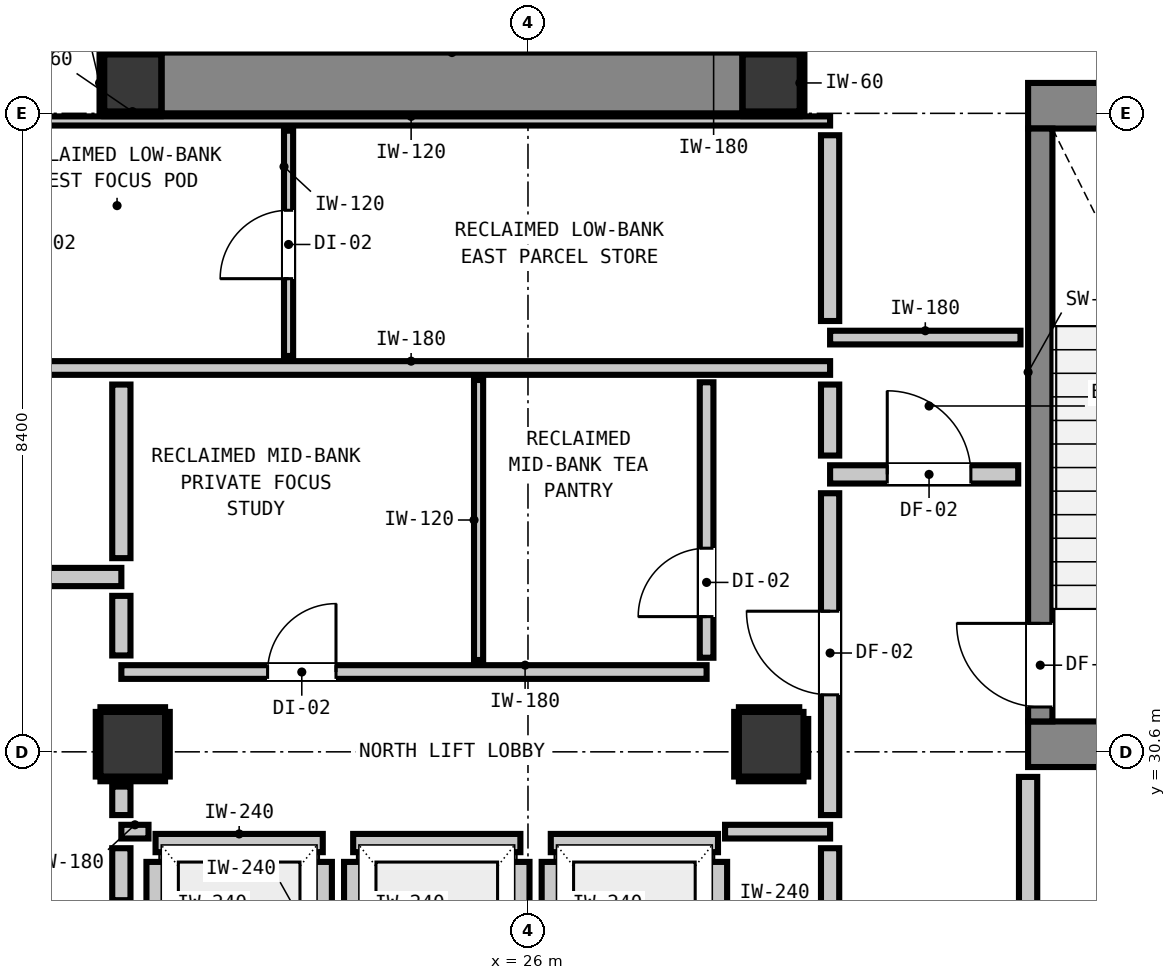
"""IFC4 building model, lengths in metres.
Left out: names, types, materials, properties, quantities, classifications, styles, units other than length and angle.
Written with IfcOpenShell. Run it as: python <this file> out.ifc"""

import sys

from ifc_helpers import new_model, si_unit, direction, frame, frame_2d, origin, origin_2d, place, context, subcontext, project, spatial, rectangle, extrude, element, fill, save


model = new_model("IFC4")
c1 = context("Model", 3, precision=1e-05, world=origin(), true_north=direction((0.0, 1.0)))
c2 = subcontext(c1, "Body", "Model", "MODEL_VIEW")
j1 = project(units=[si_unit("LENGTHUNIT", "METRE"), si_unit("PLANEANGLEUNIT", "RADIAN")], contexts=[c1])
p1 = place(None, origin())
s1 = spatial("IfcSite", under=j1, at=p1, CompositionType="ELEMENT")
p2 = place(p1, origin())
s2 = spatial("IfcBuilding", under=s1, at=p2, CompositionType="ELEMENT")
p3 = place(p2, frame((0.0, 0.0, 226.68)))
s3 = spatial("IfcBuildingStorey", under=s2, at=p3, CompositionType="ELEMENT", Elevation=226.68)
for number, where, z_axis, x_axis in (
    (1, (20.8, 39.4, 0.0), (0.0, 0.0, 1.0), (1.0, 0.0, 0.0)),
    (2, (29.2, 39.4, 0.0), (0.0, 0.0, 1.0), (1.0, 0.0, 0.0)),
):
    element("IfcColumn", number, at=place(p3, frame(where, z_axis=z_axis, x_axis=x_axis)), inside=s3, PredefinedType="COLUMN", context=c2, shape_type="SweptSolid", body=[
        extrude(rectangle(XDim=0.75, YDim=0.75, at=origin_2d()), origin(), (0.0, 0.0, 1.0), 4.6),
    ])
p4 = place(p3, frame((32.58, 39.1, 0.0), z_axis=(0.0, 0.0, 1.0), x_axis=(1.0, 0.0, 0.0)))
e3 = element("IfcWall", 3, at=p4, inside=s3, PredefinedType="SHEAR", context=c2, shape_type="SweptSolid", body=[
    extrude(rectangle(XDim=4.08, YDim=0.6, at=frame_2d((2.04, 0.0))), origin(), (0.0, 0.0, 1.0), 4.6),
])
p5 = place(p3, frame((32.58, 30.7, 0.0), z_axis=(0.0, 0.0, 1.0), x_axis=(1.0, 0.0, 0.0)))
e4 = element("IfcWall", 4, at=p5, inside=s3, PredefinedType="SHEAR", context=c2, shape_type="SweptSolid", body=[
    extrude(rectangle(XDim=3.54, YDim=0.6, at=frame_2d((1.77, 0.0))), origin(), (0.0, 0.0, 1.0), 4.6),
])
p6 = place(p3, frame((21.18, 39.4, 0.0), z_axis=(0.0, 0.0, 1.0), x_axis=(1.0, 0.0, 0.0)))
e5 = element("IfcWall", 5, at=p6, inside=s3, PredefinedType="SHEAR", context=c2, shape_type="SweptSolid", body=[
    extrude(rectangle(XDim=7.64, YDim=0.8, at=frame_2d((3.82, 0.0))), origin(), (0.0, 0.0, 1.0), 4.6),
])
p7 = place(p3, frame((32.74, 31.0, 0.0), z_axis=(0.0, 0.0, 1.0), x_axis=(0.0, 1.0, 0.0)))
e6 = element("IfcWall", 6, at=p7, inside=s3, PredefinedType="SHEAR", context=c2, shape_type="SweptSolid", body=[
    extrude(rectangle(XDim=7.8, YDim=0.32, at=frame_2d((3.9, 0.0))), origin(), (0.0, 0.0, 1.0), 4.6),
])
p8 = place(p7, frame((0.19, 0.0, 0.0)))
e7 = element("IfcOpeningElement", 7, at=p8, cuts=e6, PredefinedType="OPENING", context=c2, shape_type="SweptSolid", body=[
    extrude(rectangle(XDim=1.1, YDim=2.15, at=frame_2d((0.55, 1.075))), frame((0.0, 0.17, 0.0), z_axis=(0.0, -1.0, 0.0), x_axis=(1.0, 0.0, 0.0)), (0.0, 0.0, 1.0), 0.34),
])
for number, where, z_axis, x_axis in (
    (8, (20.8, 30.7, 0.0), (0.0, 0.0, 1.0), (1.0, 0.0, 0.0)),
    (9, (29.2, 30.7, 0.0), (0.0, 0.0, 1.0), (1.0, 0.0, 0.0)),
):
    element("IfcColumn", number, at=place(p3, frame(where, z_axis=z_axis, x_axis=x_axis)), inside=s3, PredefinedType="COLUMN", context=c2, shape_type="SweptSolid", body=[
        extrude(rectangle(XDim=0.85, YDim=0.85, at=origin_2d()), origin(), (0.0, 0.0, 1.0), 4.6),
    ])
p9 = place(p3, frame((21.1, 29.4, 0.0), z_axis=(0.0, 0.0, 1.0), x_axis=(1.0, 0.0, 0.0)))
e10 = element("IfcWall", 10, at=p9, inside=s3, PredefinedType="PARTITIONING", context=c2, shape_type="SweptSolid", body=[
    extrude(rectangle(XDim=2.2, YDim=0.24, at=frame_2d((1.1, 0.0))), origin(), (0.0, 0.0, 1.0), 4.18),
])
p10 = place(p3, frame((21.1, 27.048, 0.0), z_axis=(0.0, 0.0, 1.0), x_axis=(0.0, 1.0, 0.0)))
e11 = element("IfcWall", 11, at=p10, inside=s3, PredefinedType="PARTITIONING", context=c2, shape_type="SweptSolid", body=[
    extrude(rectangle(XDim=2.104, YDim=0.24, at=frame_2d((1.052, 0.0))), origin(), (0.0, 0.0, 1.0), 2.185),
])
p11 = place(p3, frame((23.3, 27.048, 0.0), z_axis=(0.0, 0.0, 1.0), x_axis=(0.0, 1.0, 0.0)))
e12 = element("IfcWall", 12, at=p11, inside=s3, PredefinedType="PARTITIONING", context=c2, shape_type="SweptSolid", body=[
    extrude(rectangle(XDim=2.104, YDim=0.24, at=frame_2d((1.052, 0.0))), origin(), (0.0, 0.0, 1.0), 4.18),
])
p12 = place(p3, frame((23.7, 29.4, 0.0), z_axis=(0.0, 0.0, 1.0), x_axis=(1.0, 0.0, 0.0)))
e13 = element("IfcWall", 13, at=p12, inside=s3, PredefinedType="PARTITIONING", context=c2, shape_type="SweptSolid", body=[
    extrude(rectangle(XDim=2.2, YDim=0.24, at=frame_2d((1.1, 0.0))), origin(), (0.0, 0.0, 1.0), 4.18),
])
for number, where, z_axis, x_axis in (
    (14, (23.7, 27.048, 0.0), (0.0, 0.0, 1.0), (0.0, 1.0, 0.0)),
    (15, (25.9, 27.048, 0.0), (0.0, 0.0, 1.0), (0.0, 1.0, 0.0)),
):
    element("IfcWall", number, at=place(p3, frame(where, z_axis=z_axis, x_axis=x_axis)), inside=s3, PredefinedType="PARTITIONING", context=c2, shape_type="SweptSolid", body=[
        extrude(rectangle(XDim=2.104, YDim=0.24, at=frame_2d((1.052, 0.0))), origin(), (0.0, 0.0, 1.0), 4.18),
    ])
p13 = place(p3, frame((26.3, 29.4, 0.0), z_axis=(0.0, 0.0, 1.0), x_axis=(1.0, 0.0, 0.0)))
e16 = element("IfcWall", 16, at=p13, inside=s3, PredefinedType="PARTITIONING", context=c2, shape_type="SweptSolid", body=[
    extrude(rectangle(XDim=2.2, YDim=0.24, at=frame_2d((1.1, 0.0))), origin(), (0.0, 0.0, 1.0), 4.18),
])
p14 = place(p3, frame((26.3, 27.048, 0.0), z_axis=(0.0, 0.0, 1.0), x_axis=(0.0, 1.0, 0.0)))
e17 = element("IfcWall", 17, at=p14, inside=s3, PredefinedType="PARTITIONING", context=c2, shape_type="SweptSolid", body=[
    extrude(rectangle(XDim=2.104, YDim=0.24, at=frame_2d((1.052, 0.0))), origin(), (0.0, 0.0, 1.0), 4.18),
])
p15 = place(p3, frame((28.5, 27.33, 0.0), z_axis=(0.0, 0.0, 1.0), x_axis=(0.0, 1.0, 0.0)))
e18 = element("IfcWall", 18, at=p15, inside=s3, PredefinedType="PARTITIONING", context=c2, shape_type="SweptSolid", body=[
    extrude(rectangle(XDim=1.822, YDim=0.24, at=frame_2d((0.911, 0.0))), origin(), (0.0, 0.0, 1.0), 2.185),
])
p16 = place(p3, frame((17.45, 32.9, 0.0), z_axis=(0.0, 0.0, 1.0), x_axis=(1.0, 0.0, 0.0)))
e19 = element("IfcWall", 19, at=p16, inside=s3, PredefinedType="PARTITIONING", context=c2, shape_type="SweptSolid", body=[
    extrude(rectangle(XDim=3.2, YDim=0.24, at=frame_2d((1.6, 0.0))), origin(), (0.0, 0.0, 1.0), 4.18),
])
p17 = place(p16, frame((0.159, 0.0, 0.0)))
e20 = element("IfcOpeningElement", 20, at=p17, cuts=e19, PredefinedType="OPENING", context=c2, shape_type="SweptSolid", body=[
    extrude(rectangle(XDim=1.1, YDim=2.15, at=frame_2d((0.55, 1.075))), frame((0.0, 0.13, 0.0), z_axis=(0.0, -1.0, 0.0), x_axis=(1.0, 0.0, 0.0)), (0.0, 0.0, 1.0), 0.26),
])
p18 = place(p3, frame((29.975, 34.25, 0.0), z_axis=(0.0, 0.0, 1.0), x_axis=(1.0, 0.0, 0.0)))
e21 = element("IfcWall", 21, at=p18, inside=s3, PredefinedType="PARTITIONING", context=c2, shape_type="SweptSolid", body=[
    extrude(rectangle(XDim=2.475, YDim=0.24, at=frame_2d((1.237, 0.0))), origin(), (0.0, 0.0, 1.0), 4.18),
])
p19 = place(p18, frame((0.752, 0.0, 0.0)))
e22 = element("IfcOpeningElement", 22, at=p19, cuts=e21, PredefinedType="OPENING", context=c2, shape_type="SweptSolid", body=[
    extrude(rectangle(XDim=1.1, YDim=2.15, at=frame_2d((0.55, 1.075))), frame((0.0, 0.13, 0.0), z_axis=(0.0, -1.0, 0.0), x_axis=(1.0, 0.0, 0.0)), (0.0, 0.0, 1.0), 0.26),
])
p20 = place(p3, frame((20.65, 29.55, 0.0), z_axis=(0.0, 0.0, 1.0), x_axis=(1.0, 0.0, 0.0)))
e23 = element("IfcWall", 23, at=p20, inside=s3, PredefinedType="PARTITIONING", context=c2, shape_type="SweptSolid", body=[
    extrude(rectangle(XDim=0.357, YDim=0.18, at=frame_2d((0.179, 0.0))), origin(), (0.0, 0.0, 1.0), 4.18),
])
p21 = place(p3, frame((28.593, 29.55, 0.0), z_axis=(0.0, 0.0, 1.0), x_axis=(1.0, 0.0, 0.0)))
e24 = element("IfcWall", 24, at=p21, inside=s3, PredefinedType="PARTITIONING", context=c2, shape_type="SweptSolid", body=[
    extrude(rectangle(XDim=1.382, YDim=0.18, at=frame_2d((0.691, 0.0))), origin(), (0.0, 0.0, 1.0), 4.18),
])
p22 = place(p3, frame((20.65, 31.65, 0.0), z_axis=(0.0, 0.0, 1.0), x_axis=(1.0, 0.0, 0.0)))
e25 = element("IfcWall", 25, at=p22, inside=s3, PredefinedType="PARTITIONING", context=c2, shape_type="SweptSolid", body=[
    extrude(rectangle(XDim=7.7, YDim=0.18, at=frame_2d((3.85, 0.0))), origin(), (0.0, 0.0, 1.0), 4.18),
])
p23 = place(p22, frame((1.924, 0.0, 0.0)))
e26 = element("IfcOpeningElement", 26, at=p23, cuts=e25, PredefinedType="OPENING", context=c2, shape_type="SweptSolid", body=[
    extrude(rectangle(XDim=0.9, YDim=2.1, at=frame_2d((0.45, 1.05))), frame((0.0, 0.1, 0.0), z_axis=(0.0, -1.0, 0.0), x_axis=(1.0, 0.0, 0.0)), (0.0, 0.0, 1.0), 0.2),
])
p24 = place(p3, frame((18.95, 35.65, 0.0), z_axis=(0.0, 0.0, 1.0), x_axis=(1.0, 0.0, 0.0)))
e27 = element("IfcWall", 27, at=p24, inside=s3, PredefinedType="PARTITIONING", context=c2, shape_type="SweptSolid", body=[
    extrude(rectangle(XDim=11.025, YDim=0.18, at=frame_2d((5.513, 0.0))), origin(), (0.0, 0.0, 1.0), 4.18),
])
p25 = place(p3, frame((29.975, 36.05, 0.0), z_axis=(0.0, 0.0, 1.0), x_axis=(1.0, 0.0, 0.0)))
e28 = element("IfcWall", 28, at=p25, inside=s3, PredefinedType="PARTITIONING", context=c2, shape_type="SweptSolid", body=[
    extrude(rectangle(XDim=2.505, YDim=0.18, at=frame_2d((1.252, 0.0))), origin(), (0.0, 0.0, 1.0), 4.18),
])
p26 = place(p3, frame((18.95, 38.9, 0.0), z_axis=(0.0, 0.0, 1.0), x_axis=(1.0, 0.0, 0.0)))
e29 = element("IfcWall", 29, at=p26, inside=s3, PredefinedType="PARTITIONING", context=c2, shape_type="SweptSolid", body=[
    extrude(rectangle(XDim=11.025, YDim=0.12, at=frame_2d((5.513, 0.0))), origin(), (0.0, 0.0, 1.0), 2.185),
])
p27 = place(p3, frame((20.65, 28.648, 0.0), z_axis=(0.0, 0.0, 1.0), x_axis=(0.0, 1.0, 0.0)))
e30 = element("IfcWall", 30, at=p27, inside=s3, PredefinedType="PARTITIONING", context=c2, shape_type="SweptSolid", body=[
    extrude(rectangle(XDim=0.684, YDim=0.24, at=frame_2d((0.342, 0.0))), origin(), (0.0, 0.0, 1.0), 2.185),
])
p28 = place(p3, frame((20.65, 29.768, 0.0), z_axis=(0.0, 0.0, 1.0), x_axis=(0.0, 1.0, 0.0)))
e31 = element("IfcWall", 31, at=p28, inside=s3, PredefinedType="PARTITIONING", context=c2, shape_type="SweptSolid", body=[
    extrude(rectangle(XDim=0.375, YDim=0.24, at=frame_2d((0.188, 0.0))), origin(), (0.0, 0.0, 1.0), 2.185),
])
p29 = place(p3, frame((20.65, 31.868, 0.0), z_axis=(0.0, 0.0, 1.0), x_axis=(0.0, 1.0, 0.0)))
e32 = element("IfcWall", 32, at=p29, inside=s3, PredefinedType="PARTITIONING", context=c2, shape_type="SweptSolid", body=[
    extrude(rectangle(XDim=0.784, YDim=0.24, at=frame_2d((0.392, 0.0))), origin(), (0.0, 0.0, 1.0), 2.185),
])
p30 = place(p3, frame((20.65, 33.148, 0.0), z_axis=(0.0, 0.0, 1.0), x_axis=(0.0, 1.0, 0.0)))
e33 = element("IfcWall", 33, at=p30, inside=s3, PredefinedType="PARTITIONING", context=c2, shape_type="SweptSolid", body=[
    extrude(rectangle(XDim=2.284, YDim=0.24, at=frame_2d((1.142, 0.0))), origin(), (0.0, 0.0, 1.0), 2.185),
])
p31 = place(p3, frame((29.975, 25.648, 0.0), z_axis=(0.0, 0.0, 1.0), x_axis=(0.0, 1.0, 0.0)))
e34 = element("IfcWall", 34, at=p31, inside=s3, PredefinedType="PARTITIONING", context=c2, shape_type="SweptSolid", body=[
    extrude(rectangle(XDim=3.684, YDim=0.24, at=frame_2d((1.842, 0.0))), origin(), (0.0, 0.0, 1.0), 4.18),
])
p32 = place(p3, frame((29.975, 29.768, 0.0), z_axis=(0.0, 0.0, 1.0), x_axis=(0.0, 1.0, 0.0)))
e35 = element("IfcWall", 35, at=p32, inside=s3, PredefinedType="PARTITIONING", context=c2, shape_type="SweptSolid", body=[
    extrude(rectangle(XDim=4.234, YDim=0.24, at=frame_2d((2.117, 0.0))), origin(), (0.0, 0.0, 1.0), 4.18),
])
p33 = place(p32, frame((1.582, 0.0, 0.0)))
e36 = element("IfcOpeningElement", 36, at=p33, cuts=e35, PredefinedType="OPENING", context=c2, shape_type="SweptSolid", body=[
    extrude(rectangle(XDim=1.1, YDim=2.15, at=frame_2d((0.55, 1.075))), frame((0.0, 0.13, 0.0), z_axis=(0.0, -1.0, 0.0), x_axis=(1.0, 0.0, 0.0)), (0.0, 0.0, 1.0), 0.26),
])
p34 = place(p3, frame((29.975, 34.498, 0.0), z_axis=(0.0, 0.0, 1.0), x_axis=(0.0, 1.0, 0.0)))
e37 = element("IfcWall", 37, at=p34, inside=s3, PredefinedType="PARTITIONING", context=c2, shape_type="SweptSolid", body=[
    extrude(rectangle(XDim=0.934, YDim=0.24, at=frame_2d((0.467, 0.0))), origin(), (0.0, 0.0, 1.0), 4.18),
])
p35 = place(p3, frame((29.975, 36.268, 0.0), z_axis=(0.0, 0.0, 1.0), x_axis=(0.0, 1.0, 0.0)))
e38 = element("IfcWall", 38, at=p35, inside=s3, PredefinedType="PARTITIONING", context=c2, shape_type="SweptSolid", body=[
    extrude(rectangle(XDim=2.444, YDim=0.24, at=frame_2d((1.222, 0.0))), origin(), (0.0, 0.0, 1.0), 4.18),
])
p36 = place(p3, frame((32.58, 25.648, 0.0), z_axis=(0.0, 0.0, 1.0), x_axis=(0.0, 1.0, 0.0)))
e39 = element("IfcWall", 39, at=p36, inside=s3, PredefinedType="PARTITIONING", context=c2, shape_type="SweptSolid", body=[
    extrude(rectangle(XDim=4.622, YDim=0.24, at=frame_2d((2.311, 0.0))), origin(), (0.0, 0.0, 1.0), 4.18),
])
p37 = place(p3, frame((28.35, 31.838, 0.0), z_axis=(0.0, 0.0, 1.0), x_axis=(0.0, 1.0, 0.0)))
e40 = element("IfcWall", 40, at=p37, inside=s3, PredefinedType="PARTITIONING", context=c2, shape_type="SweptSolid", body=[
    extrude(rectangle(XDim=3.624, YDim=0.18, at=frame_2d((1.812, 0.0))), origin(), (0.0, 0.0, 1.0), 4.18),
])
p38 = place(p37, frame((0.541, 0.0, 0.0)))
e41 = element("IfcOpeningElement", 41, at=p38, cuts=e40, PredefinedType="OPENING", context=c2, shape_type="SweptSolid", body=[
    extrude(rectangle(XDim=0.9, YDim=2.1, at=frame_2d((0.45, 1.05))), frame((0.0, 0.1, 0.0), z_axis=(0.0, -1.0, 0.0), x_axis=(1.0, 0.0, 0.0)), (0.0, 0.0, 1.0), 0.2),
])
p39 = place(p3, frame((22.85, 35.808, 0.0), z_axis=(0.0, 0.0, 1.0), x_axis=(0.0, 1.0, 0.0)))
e42 = element("IfcWall", 42, at=p39, inside=s3, PredefinedType="PARTITIONING", context=c2, shape_type="SweptSolid", body=[
    extrude(rectangle(XDim=2.964, YDim=0.12, at=frame_2d((1.482, 0.0))), origin(), (0.0, 0.0, 1.0), 4.18),
])
p40 = place(p39, frame((1.017, 0.0, 0.0)))
e43 = element("IfcOpeningElement", 43, at=p40, cuts=e42, PredefinedType="OPENING", context=c2, shape_type="SweptSolid", body=[
    extrude(rectangle(XDim=0.9, YDim=2.1, at=frame_2d((0.45, 1.05))), frame((0.0, 0.07, 0.0), z_axis=(0.0, -1.0, 0.0), x_axis=(1.0, 0.0, 0.0)), (0.0, 0.0, 1.0), 0.14),
])
p41 = place(p3, frame((25.35, 31.808, 0.0), z_axis=(0.0, 0.0, 1.0), x_axis=(0.0, 1.0, 0.0)))
e44 = element("IfcWall", 44, at=p41, inside=s3, PredefinedType="PARTITIONING", context=c2, shape_type="SweptSolid", body=[
    extrude(rectangle(XDim=3.684, YDim=0.12, at=frame_2d((1.842, 0.0))), origin(), (0.0, 0.0, 1.0), 4.18),
])
for number, where, z_axis, x_axis in (
    (45, (20.425, 38.993, 0.0), (0.0, 0.0, 1.0), (1.0, 0.0, 0.0)),
    (46, (20.425, 39.807, 0.0), (0.0, 0.0, 1.0), (1.0, 0.0, 0.0)),
):
    element("IfcWall", number, at=place(p3, frame(where, z_axis=z_axis, x_axis=x_axis)), inside=s3, PredefinedType="PARTITIONING", context=c2, shape_type="SweptSolid", body=[
        extrude(rectangle(XDim=0.742, YDim=0.06, at=frame_2d((0.371, 0.0))), origin(), (0.0, 0.0, 1.0), 1.45),
    ])
p42 = place(p3, frame((20.393, 39.025, 0.0), z_axis=(0.0, 0.0, 1.0), x_axis=(0.0, 1.0, 0.0)))
e47 = element("IfcWall", 47, at=p42, inside=s3, PredefinedType="PARTITIONING", context=c2, shape_type="SweptSolid", body=[
    extrude(rectangle(XDim=0.75, YDim=0.06, at=frame_2d((0.375, 0.0))), origin(), (0.0, 0.0, 1.0), 1.45),
])
for number, where, z_axis, x_axis in (
    (48, (28.833, 38.993, 0.0), (0.0, 0.0, 1.0), (1.0, 0.0, 0.0)),
    (49, (28.833, 39.807, 0.0), (0.0, 0.0, 1.0), (1.0, 0.0, 0.0)),
):
    element("IfcWall", number, at=place(p3, frame(where, z_axis=z_axis, x_axis=x_axis)), inside=s3, PredefinedType="PARTITIONING", context=c2, shape_type="SweptSolid", body=[
        extrude(rectangle(XDim=0.742, YDim=0.06, at=frame_2d((0.371, 0.0))), origin(), (0.0, 0.0, 1.0), 1.45),
    ])
p43 = place(p3, frame((29.607, 39.025, 0.0), z_axis=(0.0, 0.0, 1.0), x_axis=(0.0, 1.0, 0.0)))
e50 = element("IfcWall", 50, at=p43, inside=s3, PredefinedType="PARTITIONING", context=c2, shape_type="SweptSolid", body=[
    extrude(rectangle(XDim=0.75, YDim=0.06, at=frame_2d((0.375, 0.0))), origin(), (0.0, 0.0, 1.0), 1.45),
])
for number, where, z_axis, x_axis in (
    (51, (20.375, 30.243, 0.0), (0.0, 0.0, 1.0), (1.0, 0.0, 0.0)),
    (52, (20.375, 31.157, 0.0), (0.0, 0.0, 1.0), (1.0, 0.0, 0.0)),
    (53, (20.343, 30.275, 0.0), (0.0, 0.0, 1.0), (0.0, 1.0, 0.0)),
    (54, (21.257, 30.275, 0.0), (0.0, 0.0, 1.0), (0.0, 1.0, 0.0)),
    (55, (28.775, 30.243, 0.0), (0.0, 0.0, 1.0), (1.0, 0.0, 0.0)),
):
    element("IfcWall", number, at=place(p3, frame(where, z_axis=z_axis, x_axis=x_axis)), inside=s3, PredefinedType="PARTITIONING", context=c2, shape_type="SweptSolid", body=[
        extrude(rectangle(XDim=0.85, YDim=0.06, at=frame_2d((0.425, 0.0))), origin(), (0.0, 0.0, 1.0), 1.45),
    ])
p44 = place(p3, frame((28.775, 31.157, 0.0), z_axis=(0.0, 0.0, 1.0), x_axis=(1.0, 0.0, 0.0)))
e56 = element("IfcWall", 56, at=p44, inside=s3, PredefinedType="PARTITIONING", context=c2, shape_type="SweptSolid", body=[
    extrude(rectangle(XDim=0.794, YDim=0.06, at=frame_2d((0.397, 0.0))), origin(), (0.0, 0.0, 1.0), 1.45),
])
p45 = place(p3, frame((28.743, 30.275, 0.0), z_axis=(0.0, 0.0, 1.0), x_axis=(0.0, 1.0, 0.0)))
e57 = element("IfcWall", 57, at=p45, inside=s3, PredefinedType="PARTITIONING", context=c2, shape_type="SweptSolid", body=[
    extrude(rectangle(XDim=0.85, YDim=0.06, at=frame_2d((0.425, 0.0))), origin(), (0.0, 0.0, 1.0), 1.45),
])
p46 = place(p3, frame((29.657, 30.275, 0.0), z_axis=(0.0, 0.0, 1.0), x_axis=(0.0, 1.0, 0.0)))
e58 = element("IfcWall", 58, at=p46, inside=s3, PredefinedType="PARTITIONING", context=c2, shape_type="SweptSolid", body=[
    extrude(rectangle(XDim=0.757, YDim=0.06, at=frame_2d((0.378, 0.0))), origin(), (0.0, 0.0, 1.0), 1.45),
])
p47 = place(p8, origin())
e59 = element("IfcDoor", 59, at=p47, inside=s3, OperationType="SINGLE_SWING_RIGHT", PredefinedType="DOOR", context=c2, shape_type="SweptSolid", body=[
    extrude(rectangle(XDim=1.1, YDim=2.15, at=frame_2d((0.55, 1.075))), frame((0.0, 0.025, 0.0), z_axis=(0.0, -1.0, 0.0), x_axis=(1.0, 0.0, 0.0)), (0.0, 0.0, 1.0), 0.05),
])
fill(e7, e59)
p48 = place(p33, origin())
e60 = element("IfcDoor", 60, at=p48, inside=s3, OperationType="SINGLE_SWING_RIGHT", PredefinedType="DOOR", context=c2, shape_type="SweptSolid", body=[
    extrude(rectangle(XDim=1.1, YDim=2.15, at=frame_2d((0.55, 1.075))), frame((0.0, 0.025, 0.0), z_axis=(0.0, -1.0, 0.0), x_axis=(1.0, 0.0, 0.0)), (0.0, 0.0, 1.0), 0.05),
])
fill(e36, e60)
p49 = place(p19, origin())
e61 = element("IfcDoor", 61, at=p49, inside=s3, OperationType="SINGLE_SWING_LEFT", PredefinedType="DOOR", context=c2, shape_type="SweptSolid", body=[
    extrude(rectangle(XDim=1.1, YDim=2.15, at=frame_2d((0.55, 1.075))), frame((0.0, 0.025, 0.0), z_axis=(0.0, -1.0, 0.0), x_axis=(1.0, 0.0, 0.0)), (0.0, 0.0, 1.0), 0.05),
])
fill(e22, e61)
p50 = place(p40, origin())
e62 = element("IfcDoor", 62, at=p50, inside=s3, OperationType="SINGLE_SWING_LEFT", PredefinedType="DOOR", context=c2, shape_type="SweptSolid", body=[
    extrude(rectangle(XDim=0.9, YDim=2.1, at=frame_2d((0.45, 1.05))), frame((0.0, 0.025, 0.0), z_axis=(0.0, -1.0, 0.0), x_axis=(1.0, 0.0, 0.0)), (0.0, 0.0, 1.0), 0.05),
])
fill(e43, e62)
p51 = place(p23, origin())
e63 = element("IfcDoor", 63, at=p51, inside=s3, OperationType="SINGLE_SWING_RIGHT", PredefinedType="DOOR", context=c2, shape_type="SweptSolid", body=[
    extrude(rectangle(XDim=0.9, YDim=2.1, at=frame_2d((0.45, 1.05))), frame((0.0, 0.025, 0.0), z_axis=(0.0, -1.0, 0.0), x_axis=(1.0, 0.0, 0.0)), (0.0, 0.0, 1.0), 0.05),
])
fill(e26, e63)
p52 = place(p38, origin())
e64 = element("IfcDoor", 64, at=p52, inside=s3, OperationType="SINGLE_SWING_LEFT", PredefinedType="DOOR", context=c2, shape_type="SweptSolid", body=[
    extrude(rectangle(XDim=0.9, YDim=2.1, at=frame_2d((0.45, 1.05))), frame((0.0, 0.025, 0.0), z_axis=(0.0, -1.0, 0.0), x_axis=(1.0, 0.0, 0.0)), (0.0, 0.0, 1.0), 0.05),
])
fill(e41, e64)
save(model, sys.argv[1])
